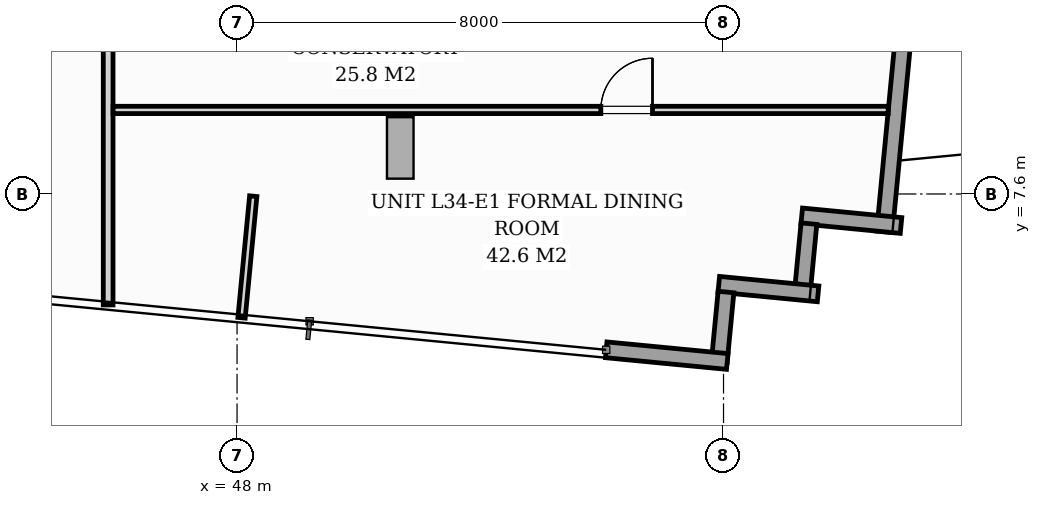
"""IFC4 building model, lengths in metres.
Left out: names, types, materials, properties, quantities, classifications, styles, units other than length and angle.
Written with IfcOpenShell. Run it as: python <this file> out.ifc"""

import sys

from ifc_helpers import new_model, si_unit, direction, frame, frame_2d, origin, origin_2d, place, context, subcontext, project, spatial, rectangle, i_section, extrude, source, transform, mapped, element, fill, save


model = new_model("IFC4")
c1 = context("Model", 3, precision=1e-05, world=origin(), true_north=direction((0.0, 1.0)))
c2 = subcontext(c1, "Body", "Model", "MODEL_VIEW")
j1 = project(units=[si_unit("LENGTHUNIT", "METRE"), si_unit("PLANEANGLEUNIT", "RADIAN")], contexts=[c1])
p1 = place(None, origin())
s1 = spatial("IfcSite", under=j1, at=p1, CompositionType="ELEMENT")
p2 = place(p1, origin())
s2 = spatial("IfcBuilding", under=s1, at=p2, CompositionType="ELEMENT")
p3 = place(p2, frame((0.0, 0.0, 119.4)))
s3 = spatial("IfcBuildingStorey", under=s2, at=p3, CompositionType="ELEMENT", Elevation=119.4)
m1 = source(origin(), c2, "Body", "SweptSolid", [
    extrude(i_section(OverallWidth=0.438, OverallDepth=1.011, WebThickness=0.041, FlangeThickness=0.074, FilletRadius=0.024, at=origin_2d()), origin(), (0.0, 0.0, 1.0), 9.879),
])
p4 = place(p3, frame((52.668, 8.704, 0.208), z_axis=(-0.883824382848, -0.154157714467, 0.44168977728), x_axis=(0.435120582334, 0.075894256588, 0.897167844189)))
e1 = element("IfcColumn", 1, at=p4, inside=s3, PredefinedType="COLUMN", context=c2, shape_type="MappedRepresentation", body=[
    mapped(m1, transform((0.0, 0.0, 0.0), scale=1.0)),
])
m2 = source(origin(), c2, "Body", "SweptSolid", [
    extrude(i_section(OverallWidth=0.438, OverallDepth=1.011, WebThickness=0.041, FlangeThickness=0.074, FilletRadius=0.024, at=origin_2d()), origin(), (0.0, 0.0, 1.0), 11.564),
])
p5 = place(p3, frame((65.628, 9.851, 0.215), z_axis=(-0.870363070026, -0.31765876899, 0.376245973825), x_axis=(0.353441551534, 0.128996521149, 0.92651981478)))
e2 = element("IfcColumn", 2, at=p5, inside=s3, PredefinedType="COLUMN", context=c2, shape_type="MappedRepresentation", body=[
    mapped(m2, transform((0.0, 0.0, 0.0), scale=1.0)),
])
p6 = place(p3, frame((60.047, 21.51, 0.0), z_axis=(0.0, 0.0, 1.0), x_axis=(-0.095849096434, -0.995395876379, 0.0)))
e3 = element("IfcWall", 3, at=p6, inside=s3, PredefinedType="STANDARD", context=c2, shape_type="SweptSolid", body=[
    extrude(rectangle(XDim=14.6, YDim=0.26, at=frame_2d((7.3, 0.0))), origin(), (0.0, 0.0, 1.0), 4.78),
])
p7 = place(p6, frame((1.79, 0.0, 0.0)))
e4 = element("IfcOpeningElement", 4, at=p7, cuts=e3, PredefinedType="OPENING", context=c2, shape_type="SweptSolid", body=[
    extrude(rectangle(XDim=1.8, YDim=2.1, at=frame_2d((0.9, 1.05))), frame((0.0, 0.14, 0.0), z_axis=(0.0, -1.0, 0.0), x_axis=(1.0, 0.0, 0.0)), (0.0, 0.0, 1.0), 0.28),
])
p8 = place(p3, frame((58.919, 7.082, 0.0), z_axis=(0.0, 0.0, 1.0), x_axis=(-0.995393194909, 0.095876939504, 0.0)))
e5 = element("IfcWall", 5, at=p8, inside=s3, PredefinedType="STANDARD", context=c2, shape_type="SweptSolid", body=[
    extrude(rectangle(XDim=1.64, YDim=0.26, at=frame_2d((0.82, 0.0))), origin(), (0.0, 0.0, 1.0), 4.78),
])
p9 = place(p3, frame((57.405, 7.112, 0.0), z_axis=(0.0, 0.0, 1.0), x_axis=(-0.095971333708, -0.995384098279, 0.0)))
e6 = element("IfcWall", 6, at=p9, inside=s3, PredefinedType="STANDARD", context=c2, shape_type="SweptSolid", body=[
    extrude(rectangle(XDim=1.15, YDim=0.26, at=frame_2d((0.575, 0.0))), origin(), (0.0, 0.0, 1.0), 4.78),
])
p10 = place(p3, frame((57.555, 5.958, 0.0), z_axis=(0.0, 0.0, 1.0), x_axis=(-0.995407392318, 0.095729427649, 0.0)))
e7 = element("IfcWall", 7, at=p10, inside=s3, PredefinedType="STANDARD", context=c2, shape_type="SweptSolid", body=[
    extrude(rectangle(XDim=1.64, YDim=0.26, at=frame_2d((0.82, 0.0))), origin(), (0.0, 0.0, 1.0), 4.78),
])
p11 = place(p3, frame((56.041, 5.988, 0.0), z_axis=(0.0, 0.0, 1.0), x_axis=(-0.095740721699, -0.995406306092, 0.0)))
e8 = element("IfcWall", 8, at=p11, inside=s3, PredefinedType="STANDARD", context=c2, shape_type="SweptSolid", body=[
    extrude(rectangle(XDim=1.15, YDim=0.26, at=frame_2d((0.575, 0.0))), origin(), (0.0, 0.0, 1.0), 4.78),
])
p12 = place(p3, frame((56.061, 4.845, 0.0), z_axis=(0.0, 0.0, 1.0), x_axis=(-0.995397839199, 0.095828710298, 0.0)))
e9 = element("IfcWall", 9, at=p12, inside=s3, PredefinedType="STANDARD", context=c2, shape_type="SweptSolid", body=[
    extrude(rectangle(XDim=2.0, YDim=0.26, at=frame_2d((1.0, 0.0))), origin(), (0.0, 0.0, 1.0), 4.78),
])
p13 = place(p3, frame((45.88, 5.776, 0.0), z_axis=(0.0, 0.0, 1.0), x_axis=(0.0, 1.0, 0.0)))
e10 = element("IfcWall", 10, at=p13, inside=s3, PredefinedType="PARTITIONING", context=c2, shape_type="SweptSolid", body=[
    extrude(rectangle(XDim=6.692, YDim=0.16, at=frame_2d((3.346, 0.0))), origin(), (0.0, 0.0, 1.0), 4.78),
])
p14 = place(p3, frame((45.962, 8.982, 0.0), z_axis=(0.0, 0.0, 1.0), x_axis=(1.0, 0.0, 0.0)))
e11 = element("IfcWall", 11, at=p14, inside=s3, PredefinedType="PARTITIONING", context=c2, shape_type="SweptSolid", body=[
    extrude(rectangle(XDim=12.746, YDim=0.12, at=frame_2d((6.373, 0.0))), origin(), (0.0, 0.0, 1.0), 4.78),
])
p15 = place(p14, frame((8.02, 0.0, 0.0)))
e12 = element("IfcOpeningElement", 12, at=p15, cuts=e11, PredefinedType="OPENING", context=c2, shape_type="SweptSolid", body=[
    extrude(rectangle(XDim=0.85, YDim=2.05, at=frame_2d((0.425, 1.025))), frame((0.0, 0.07, 0.0), z_axis=(0.0, -1.0, 0.0), x_axis=(1.0, 0.0, 0.0)), (0.0, 0.0, 1.0), 0.14),
])
p16 = place(p3, frame((48.266, 7.564, 0.0), z_axis=(0.0, 0.0, 1.0), x_axis=(-0.095904643432, -0.995390526059, 0.0)))
e13 = element("IfcWall", 13, at=p16, inside=s3, PredefinedType="PARTITIONING", context=c2, shape_type="SweptSolid", body=[
    extrude(rectangle(XDim=2.009, YDim=0.12, at=frame_2d((1.004, 0.0))), origin(), (0.0, 0.0, 1.0), 4.78),
])
m3 = source(origin(), c2, "Body", "SweptSolid", [
    extrude(rectangle(XDim=0.85, YDim=2.05, at=frame_2d((0.425, 1.025))), frame((0.0, 0.025, 0.0), z_axis=(0.0, -1.0, 0.0), x_axis=(1.0, 0.0, 0.0)), (0.0, 0.0, 1.0), 0.05),
])
p17 = place(p15, origin())
e14 = element("IfcDoor", 14, at=p17, inside=s3, OperationType="SINGLE_SWING_RIGHT", PredefinedType="DOOR", context=c2, shape_type="MappedRepresentation", body=[
    mapped(m3, transform((0.0, 0.0, 0.0), scale=1.0)),
])
fill(e12, e14)
save(model, sys.argv[1])
